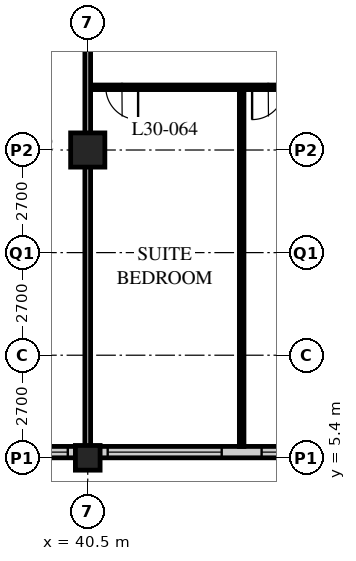
"""IFC4 building model, lengths in metres.
Left out: names, types, materials, properties, quantities, classifications, styles, units other than length and angle.
Written with IfcOpenShell. Run it as: python <this file> out.ifc"""

import sys

from ifc_helpers import new_model, si_unit, direction, frame, frame_2d, origin, origin_2d, place, context, subcontext, project, spatial, rectangle, hollow_rectangle, extrude, element, fill, save


model = new_model("IFC4")
c1 = context("Model", 3, precision=1e-05, world=origin(), true_north=direction((0.0, 1.0)))
c2 = subcontext(c1, "Body", "Model", "MODEL_VIEW")
j1 = project(units=[si_unit("LENGTHUNIT", "METRE"), si_unit("PLANEANGLEUNIT", "RADIAN")], contexts=[c1])
p1 = place(None, origin())
s1 = spatial("IfcSite", under=j1, at=p1, CompositionType="ELEMENT")
p2 = place(p1, origin())
s2 = spatial("IfcBuilding", under=s1, at=p2, CompositionType="ELEMENT")
p3 = place(p2, frame((0.0, 0.0, 120.4)))
s3 = spatial("IfcBuildingStorey", under=s2, at=p3, CompositionType="ELEMENT", Elevation=120.4)
p4 = place(p3, frame((40.5, 5.4, 0.0), z_axis=(0.0, 0.0, 1.0), x_axis=(1.0, 0.0, 0.0)))
e1 = element("IfcColumn", 1, at=p4, inside=s3, PredefinedType="COLUMN", context=c2, shape_type="SweptSolid", body=[
    extrude(hollow_rectangle(XDim=0.65, YDim=0.65, WallThickness=0.055, at=origin_2d()), origin(), (0.0, 0.0, 1.0), 3.4),
])
p5 = place(p3, frame((40.5, 13.5, 0.0), z_axis=(0.0, 0.0, 1.0), x_axis=(1.0, 0.0, 0.0)))
e2 = element("IfcColumn", 2, at=p5, inside=s3, PredefinedType="COLUMN", context=c2, shape_type="SweptSolid", body=[
    extrude(hollow_rectangle(XDim=0.9, YDim=0.9, WallThickness=0.09, at=origin_2d()), origin(), (0.0, 0.0, 1.0), 3.4),
])
p6 = place(p3, frame((8.4, 5.55, 0.0), z_axis=(0.0, 0.0, 1.0), x_axis=(1.0, 0.0, 0.0)))
e3 = element("IfcWall", 3, at=p6, inside=s3, PredefinedType="SOLIDWALL", context=c2, shape_type="SweptSolid", body=[
    extrude(rectangle(XDim=40.2, YDim=0.3, at=frame_2d((20.1, 0.0))), origin(), (0.0, 0.0, 1.0), 3.19),
])
p7 = place(p6, frame((0.225, 0.0, 0.9)))
e4 = element("IfcOpeningElement", 4, at=p7, cuts=e3, PredefinedType="OPENING", context=c2, shape_type="SweptSolid", body=[
    extrude(rectangle(XDim=3.0, YDim=2.0, at=frame_2d((1.5, 1.0))), frame((0.0, 0.16, 0.0), z_axis=(0.0, -1.0, 0.0), x_axis=(1.0, 0.0, 0.0)), (0.0, 0.0, 1.0), 0.32),
])
p8 = place(p6, frame((4.275, 0.0, 0.9)))
e5 = element("IfcOpeningElement", 5, at=p8, cuts=e3, PredefinedType="OPENING", context=c2, shape_type="SweptSolid", body=[
    extrude(rectangle(XDim=3.0, YDim=2.0, at=frame_2d((1.5, 1.0))), frame((0.0, 0.16, 0.0), z_axis=(0.0, -1.0, 0.0), x_axis=(1.0, 0.0, 0.0)), (0.0, 0.0, 1.0), 0.32),
])
p9 = place(p6, frame((8.325, 0.0, 0.9)))
e6 = element("IfcOpeningElement", 6, at=p9, cuts=e3, PredefinedType="OPENING", context=c2, shape_type="SweptSolid", body=[
    extrude(rectangle(XDim=3.0, YDim=2.0, at=frame_2d((1.5, 1.0))), frame((0.0, 0.16, 0.0), z_axis=(0.0, -1.0, 0.0), x_axis=(1.0, 0.0, 0.0)), (0.0, 0.0, 1.0), 0.32),
])
p10 = place(p6, frame((12.375, 0.0, 0.9)))
e7 = element("IfcOpeningElement", 7, at=p10, cuts=e3, PredefinedType="OPENING", context=c2, shape_type="SweptSolid", body=[
    extrude(rectangle(XDim=3.0, YDim=2.0, at=frame_2d((1.5, 1.0))), frame((0.0, 0.16, 0.0), z_axis=(0.0, -1.0, 0.0), x_axis=(1.0, 0.0, 0.0)), (0.0, 0.0, 1.0), 0.32),
])
p11 = place(p6, frame((16.425, 0.0, 0.9)))
e8 = element("IfcOpeningElement", 8, at=p11, cuts=e3, PredefinedType="OPENING", context=c2, shape_type="SweptSolid", body=[
    extrude(rectangle(XDim=3.0, YDim=2.0, at=frame_2d((1.5, 1.0))), frame((0.0, 0.16, 0.0), z_axis=(0.0, -1.0, 0.0), x_axis=(1.0, 0.0, 0.0)), (0.0, 0.0, 1.0), 0.32),
])
p12 = place(p6, frame((20.475, 0.0, 0.9)))
e9 = element("IfcOpeningElement", 9, at=p12, cuts=e3, PredefinedType="OPENING", context=c2, shape_type="SweptSolid", body=[
    extrude(rectangle(XDim=3.0, YDim=2.0, at=frame_2d((1.5, 1.0))), frame((0.0, 0.16, 0.0), z_axis=(0.0, -1.0, 0.0), x_axis=(1.0, 0.0, 0.0)), (0.0, 0.0, 1.0), 0.32),
])
p13 = place(p6, frame((24.525, 0.0, 0.9)))
e10 = element("IfcOpeningElement", 10, at=p13, cuts=e3, PredefinedType="OPENING", context=c2, shape_type="SweptSolid", body=[
    extrude(rectangle(XDim=3.0, YDim=2.0, at=frame_2d((1.5, 1.0))), frame((0.0, 0.16, 0.0), z_axis=(0.0, -1.0, 0.0), x_axis=(1.0, 0.0, 0.0)), (0.0, 0.0, 1.0), 0.32),
])
p14 = place(p6, frame((28.575, 0.0, 0.9)))
e11 = element("IfcOpeningElement", 11, at=p14, cuts=e3, PredefinedType="OPENING", context=c2, shape_type="SweptSolid", body=[
    extrude(rectangle(XDim=3.0, YDim=2.0, at=frame_2d((1.5, 1.0))), frame((0.0, 0.16, 0.0), z_axis=(0.0, -1.0, 0.0), x_axis=(1.0, 0.0, 0.0)), (0.0, 0.0, 1.0), 0.32),
])
p15 = place(p6, frame((32.625, 0.0, 0.9)))
e12 = element("IfcOpeningElement", 12, at=p15, cuts=e3, PredefinedType="OPENING", context=c2, shape_type="SweptSolid", body=[
    extrude(rectangle(XDim=3.0, YDim=2.0, at=frame_2d((1.5, 1.0))), frame((0.0, 0.16, 0.0), z_axis=(0.0, -1.0, 0.0), x_axis=(1.0, 0.0, 0.0)), (0.0, 0.0, 1.0), 0.32),
])
p16 = place(p6, frame((36.675, 0.0, 0.9)))
e13 = element("IfcOpeningElement", 13, at=p16, cuts=e3, PredefinedType="OPENING", context=c2, shape_type="SweptSolid", body=[
    extrude(rectangle(XDim=3.0, YDim=2.0, at=frame_2d((1.5, 1.0))), frame((0.0, 0.16, 0.0), z_axis=(0.0, -1.0, 0.0), x_axis=(1.0, 0.0, 0.0)), (0.0, 0.0, 1.0), 0.32),
])
p17 = place(p3, frame((40.5, 15.15, 0.0), z_axis=(0.0, 0.0, 1.0), x_axis=(1.0, 0.0, 0.0)))
e14 = element("IfcWall", 14, at=p17, inside=s3, PredefinedType="PARTITIONING", context=c2, shape_type="SweptSolid", body=[
    extrude(rectangle(XDim=8.05, YDim=0.12, at=frame_2d((4.025, 0.0))), origin(), (0.0, 0.0, 1.0), 3.19),
])
p18 = place(p17, frame((0.475, 0.0, 0.0)))
e15 = element("IfcOpeningElement", 15, at=p18, cuts=e14, PredefinedType="OPENING", context=c2, shape_type="SweptSolid", body=[
    extrude(rectangle(XDim=0.85, YDim=2.1, at=frame_2d((0.425, 1.05))), frame((0.0, 0.07, 0.0), z_axis=(0.0, -1.0, 0.0), x_axis=(1.0, 0.0, 0.0)), (0.0, 0.0, 1.0), 0.14),
])
p19 = place(p17, frame((4.325, 0.0, 0.0)))
e16 = element("IfcOpeningElement", 16, at=p19, cuts=e14, PredefinedType="OPENING", context=c2, shape_type="SweptSolid", body=[
    extrude(rectangle(XDim=0.85, YDim=2.1, at=frame_2d((0.425, 1.05))), frame((0.0, 0.07, 0.0), z_axis=(0.0, -1.0, 0.0), x_axis=(1.0, 0.0, 0.0)), (0.0, 0.0, 1.0), 0.14),
])
p20 = place(p3, frame((44.55, 15.15, 0.0), z_axis=(0.0, 0.0, 1.0), x_axis=(0.0, -1.0, 0.0)))
e17 = element("IfcWall", 17, at=p20, inside=s3, PredefinedType="PARTITIONING", context=c2, shape_type="SweptSolid", body=[
    extrude(rectangle(XDim=9.45, YDim=0.12, at=frame_2d((4.725, 0.0))), origin(), (0.0, 0.0, 1.0), 3.19),
])
p21 = place(p3, frame((40.5, 17.55, 0.0), z_axis=(0.0, 0.0, 1.0), x_axis=(0.0, -1.0, 0.0)))
e18 = element("IfcWall", 18, at=p21, inside=s3, PredefinedType="PARTITIONING", context=c2, shape_type="SweptSolid", body=[
    extrude(rectangle(XDim=11.85, YDim=0.15, at=frame_2d((5.925, 0.0))), origin(), (0.0, 0.0, 1.0), 2.578),
])
p22 = place(p14, origin())
e19 = element("IfcWindow", 19, at=p22, inside=s3, PartitioningType="SINGLE_PANEL", PredefinedType="WINDOW", context=c2, shape_type="SweptSolid", body=[
    extrude(rectangle(XDim=3.0, YDim=2.0, at=frame_2d((1.5, 1.0))), frame((0.0, 0.03, 0.0), z_axis=(0.0, -1.0, 0.0), x_axis=(1.0, 0.0, 0.0)), (0.0, 0.0, 1.0), 0.06),
])
fill(e11, e19)
p23 = place(p15, origin())
e20 = element("IfcWindow", 20, at=p23, inside=s3, PartitioningType="SINGLE_PANEL", PredefinedType="WINDOW", context=c2, shape_type="SweptSolid", body=[
    extrude(rectangle(XDim=3.0, YDim=2.0, at=frame_2d((1.5, 1.0))), frame((0.0, 0.03, 0.0), z_axis=(0.0, -1.0, 0.0), x_axis=(1.0, 0.0, 0.0)), (0.0, 0.0, 1.0), 0.06),
])
fill(e12, e20)
p24 = place(p16, origin())
e21 = element("IfcWindow", 21, at=p24, inside=s3, PartitioningType="SINGLE_PANEL", PredefinedType="WINDOW", context=c2, shape_type="SweptSolid", body=[
    extrude(rectangle(XDim=3.0, YDim=2.0, at=frame_2d((1.5, 1.0))), frame((0.0, 0.03, 0.0), z_axis=(0.0, -1.0, 0.0), x_axis=(1.0, 0.0, 0.0)), (0.0, 0.0, 1.0), 0.06),
])
fill(e13, e21)
p25 = place(p18, origin())
e22 = element("IfcDoor", 22, at=p25, inside=s3, OperationType="SINGLE_SWING_LEFT", PredefinedType="DOOR", context=c2, shape_type="SweptSolid", body=[
    extrude(rectangle(XDim=0.85, YDim=2.1, at=frame_2d((0.425, 1.05))), frame((0.0, 0.025, 0.0), z_axis=(0.0, -1.0, 0.0), x_axis=(1.0, 0.0, 0.0)), (0.0, 0.0, 1.0), 0.05),
])
fill(e15, e22)
p26 = place(p19, origin())
e23 = element("IfcDoor", 23, at=p26, inside=s3, OperationType="SINGLE_SWING_RIGHT", PredefinedType="DOOR", context=c2, shape_type="SweptSolid", body=[
    extrude(rectangle(XDim=0.85, YDim=2.1, at=frame_2d((0.425, 1.05))), frame((0.0, 0.025, 0.0), z_axis=(0.0, -1.0, 0.0), x_axis=(1.0, 0.0, 0.0)), (0.0, 0.0, 1.0), 0.05),
])
fill(e16, e23)
save(model, sys.argv[1])
